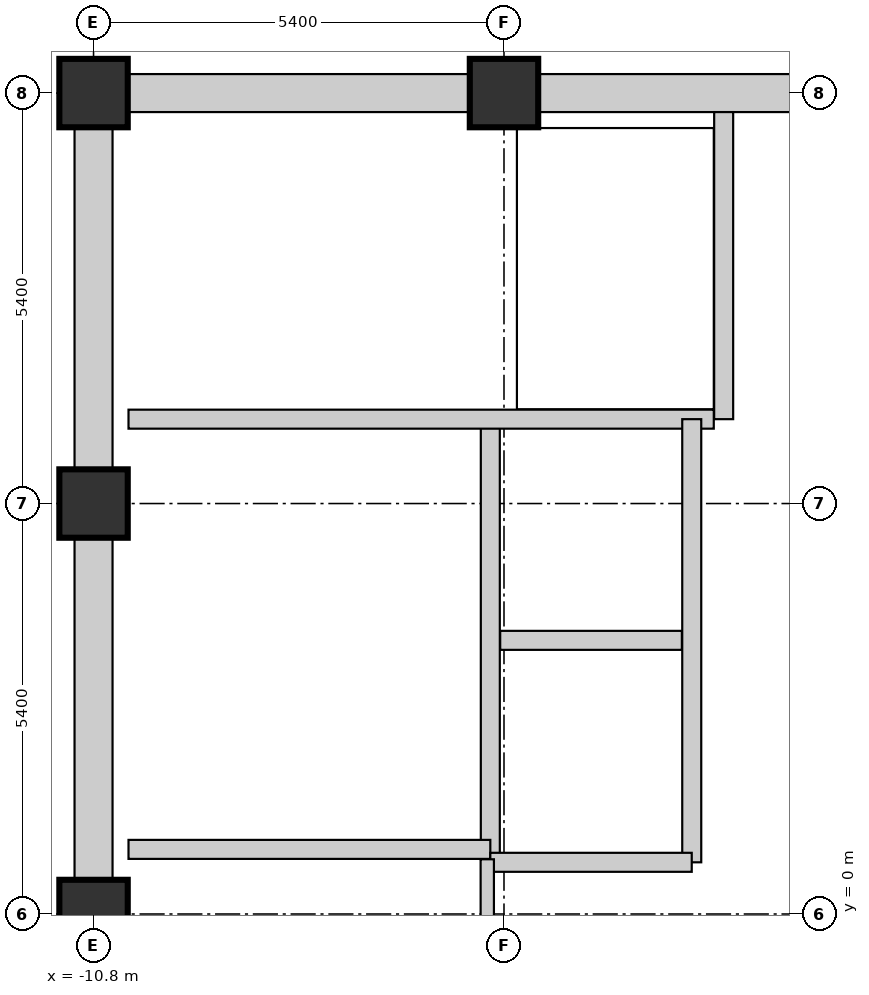
"""IFC4 building model, lengths in metres.
Left out: names, types, materials, properties, quantities, classifications, styles, units other than length and angle.
Written with IfcOpenShell. Run it as: python <this file> out.ifc"""

import sys

from ifc_helpers import new_model, si_unit, direction, frame, frame_2d, origin, origin_2d, place, context, subcontext, project, spatial, rectangle, extrude, element, fill, save


model = new_model("IFC4")
c1 = context("Model", 3, precision=1e-05, world=origin(), true_north=direction((0.0, 1.0)))
c2 = subcontext(c1, "Body", "Model", "MODEL_VIEW")
j1 = project(units=[si_unit("LENGTHUNIT", "METRE"), si_unit("PLANEANGLEUNIT", "RADIAN")], contexts=[c1])
p1 = place(None, origin())
s1 = spatial("IfcSite", under=j1, at=p1, CompositionType="ELEMENT")
p2 = place(p1, origin())
s2 = spatial("IfcBuilding", under=s1, at=p2, CompositionType="ELEMENT")
p3 = place(p2, frame((0.0, 0.0, 337.5)))
s3 = spatial("IfcBuildingStorey", under=s2, at=p3, CompositionType="ELEMENT", Elevation=337.5)
for number, where, z_axis, x_axis in (
    (1, (-10.8, 0.0, 0.0), (0.0, 0.0, 1.0), (1.0, 0.0, 0.0)),
    (2, (-10.8, 5.4, 0.0), (0.0, 0.0, 1.0), (1.0, 0.0, 0.0)),
    (3, (-10.8, 10.8, 0.0), (0.0, 0.0, 1.0), (1.0, 0.0, 0.0)),
    (4, (-5.4, 10.8, 0.0), (0.0, 0.0, 1.0), (1.0, 0.0, 0.0)),
):
    element("IfcColumn", number, at=place(p3, frame(where, z_axis=z_axis, x_axis=x_axis)), inside=s3, PredefinedType="COLUMN", context=c2, shape_type="SweptSolid", body=[
        extrude(rectangle(XDim=0.9, YDim=0.9, at=origin_2d()), origin(), (0.0, 0.0, 1.0), 4.5),
    ])
p4 = place(p3, frame((-10.34, 10.8, 0.0), z_axis=(0.0, 0.0, 1.0), x_axis=(1.0, 0.0, 0.0)))
e5 = element("IfcWall", 5, at=p4, inside=s3, PredefinedType="SHEAR", context=c2, shape_type="SweptSolid", body=[
    extrude(rectangle(XDim=4.48, YDim=0.5, at=frame_2d((2.24, 0.0))), origin(), (0.0, 0.0, 1.0), 4.5),
])
p5 = place(p3, frame((-4.94, 10.8, 0.0), z_axis=(0.0, 0.0, 1.0), x_axis=(1.0, 0.0, 0.0)))
e6 = element("IfcWall", 6, at=p5, inside=s3, PredefinedType="SHEAR", context=c2, shape_type="SweptSolid", body=[
    extrude(rectangle(XDim=4.48, YDim=0.5, at=frame_2d((2.24, 0.0))), origin(), (0.0, 0.0, 1.0), 4.5),
])
p6 = place(p5, frame((3.13, 0.0, 0.0)))
e7 = element("IfcOpeningElement", 7, at=p6, cuts=e6, PredefinedType="OPENING", context=c2, shape_type="SweptSolid", body=[
    extrude(rectangle(XDim=1.1, YDim=2.1, at=frame_2d((0.55, 1.05))), frame((0.0, 0.26, 0.0), z_axis=(0.0, -1.0, 0.0), x_axis=(1.0, 0.0, 0.0)), (0.0, 0.0, 1.0), 0.52),
])
p7 = place(p3, frame((-10.8, 0.46, 0.0), z_axis=(0.0, 0.0, 1.0), x_axis=(0.0, 1.0, 0.0)))
e8 = element("IfcWall", 8, at=p7, inside=s3, PredefinedType="SHEAR", context=c2, shape_type="SweptSolid", body=[
    extrude(rectangle(XDim=4.48, YDim=0.5, at=frame_2d((2.24, 0.0))), origin(), (0.0, 0.0, 1.0), 4.5),
])
p8 = place(p7, frame((1.69, 0.0, 0.0)))
e9 = element("IfcOpeningElement", 9, at=p8, cuts=e8, PredefinedType="OPENING", context=c2, shape_type="SweptSolid", body=[
    extrude(rectangle(XDim=1.1, YDim=2.1, at=frame_2d((0.55, 1.05))), frame((0.0, 0.26, 0.0), z_axis=(0.0, -1.0, 0.0), x_axis=(1.0, 0.0, 0.0)), (0.0, 0.0, 1.0), 0.52),
])
p9 = place(p3, frame((-10.8, 5.86, 0.0), z_axis=(0.0, 0.0, 1.0), x_axis=(0.0, 1.0, 0.0)))
e10 = element("IfcWall", 10, at=p9, inside=s3, PredefinedType="SHEAR", context=c2, shape_type="SweptSolid", body=[
    extrude(rectangle(XDim=4.48, YDim=0.5, at=frame_2d((2.24, 0.0))), origin(), (0.0, 0.0, 1.0), 4.5),
])
p10 = place(p3, frame((-5.58, 0.72, 0.0), z_axis=(0.0, 0.0, 1.0), x_axis=(0.0, 1.0, 0.0)))
e11 = element("IfcWall", 11, at=p10, inside=s3, PredefinedType="SHEAR", context=c2, shape_type="SweptSolid", body=[
    extrude(rectangle(XDim=5.79, YDim=0.25, at=frame_2d((2.895, 0.0))), origin(), (0.0, 0.0, 1.0), 4.5),
])
p11 = place(p10, frame((3.35, 0.0, 0.0)))
e12 = element("IfcOpeningElement", 12, at=p11, cuts=e11, PredefinedType="OPENING", context=c2, shape_type="SweptSolid", body=[
    extrude(rectangle(XDim=1.1, YDim=2.1, at=frame_2d((0.55, 1.05))), frame((0.0, 0.135, 0.0), z_axis=(0.0, -1.0, 0.0), x_axis=(1.0, 0.0, 0.0)), (0.0, 0.0, 1.0), 0.27),
])
p12 = place(p3, frame((-10.34, 0.85, 0.0), z_axis=(0.0, 0.0, 1.0), x_axis=(1.0, 0.0, 0.0)))
e13 = element("IfcWall", 13, at=p12, inside=s3, PredefinedType="SHEAR", context=c2, shape_type="SweptSolid", body=[
    extrude(rectangle(XDim=4.76, YDim=0.25, at=frame_2d((2.38, 0.0))), origin(), (0.0, 0.0, 1.0), 4.5),
])
p13 = place(p12, frame((1.4, 0.0, 0.0)))
e14 = element("IfcOpeningElement", 14, at=p13, cuts=e13, PredefinedType="OPENING", context=c2, shape_type="SweptSolid", body=[
    extrude(rectangle(XDim=0.95, YDim=2.1, at=frame_2d((0.475, 1.05))), frame((0.0, 0.135, 0.0), z_axis=(0.0, -1.0, 0.0), x_axis=(1.0, 0.0, 0.0)), (0.0, 0.0, 1.0), 0.27),
])
p14 = place(p3, frame((-2.51, 6.51, 0.0), z_axis=(0.0, 0.0, 1.0), x_axis=(0.0, 1.0, 0.0)))
e15 = element("IfcWall", 15, at=p14, inside=s3, PredefinedType="SHEAR", context=c2, shape_type="SweptSolid", body=[
    extrude(rectangle(XDim=4.04, YDim=0.25, at=frame_2d((2.02, 0.0))), origin(), (0.0, 0.0, 1.0), 4.5),
])
p15 = place(p3, frame((-10.34, 6.51, 0.0), z_axis=(0.0, 0.0, 1.0), x_axis=(1.0, 0.0, 0.0)))
e16 = element("IfcWall", 16, at=p15, inside=s3, PredefinedType="SHEAR", context=c2, shape_type="SweptSolid", body=[
    extrude(rectangle(XDim=7.7, YDim=0.25, at=frame_2d((3.85, 0.0))), origin(), (0.0, 0.0, 1.0), 4.5),
])
p16 = place(p15, frame((0.35, 0.0, 0.0)))
e17 = element("IfcOpeningElement", 17, at=p16, cuts=e16, PredefinedType="OPENING", context=c2, shape_type="SweptSolid", body=[
    extrude(rectangle(XDim=1.1, YDim=2.1, at=frame_2d((0.55, 1.05))), frame((0.0, 0.135, 0.0), z_axis=(0.0, -1.0, 0.0), x_axis=(1.0, 0.0, 0.0)), (0.0, 0.0, 1.0), 0.27),
])
p17 = place(p3, frame((-2.93, 0.68, 0.0), z_axis=(0.0, 0.0, 1.0), x_axis=(0.0, 1.0, 0.0)))
e18 = element("IfcWall", 18, at=p17, inside=s3, PredefinedType="SHEAR", context=c2, shape_type="SweptSolid", body=[
    extrude(rectangle(XDim=5.83, YDim=0.25, at=frame_2d((2.915, 0.0))), origin(), (0.0, 0.0, 1.0), 4.5),
])
p18 = place(p17, frame((0.75, 0.0, 0.0)))
e19 = element("IfcOpeningElement", 19, at=p18, cuts=e18, PredefinedType="OPENING", context=c2, shape_type="SweptSolid", body=[
    extrude(rectangle(XDim=1.2, YDim=2.1, at=frame_2d((0.6, 1.05))), frame((0.0, 0.135, 0.0), z_axis=(0.0, -1.0, 0.0), x_axis=(1.0, 0.0, 0.0)), (0.0, 0.0, 1.0), 0.27),
])
p19 = place(p3, frame((-5.45, 3.6, 0.0), z_axis=(0.0, 0.0, 1.0), x_axis=(1.0, 0.0, 0.0)))
e20 = element("IfcWall", 20, at=p19, inside=s3, PredefinedType="SHEAR", context=c2, shape_type="SweptSolid", body=[
    extrude(rectangle(XDim=2.39, YDim=0.25, at=frame_2d((1.195, 0.0))), origin(), (0.0, 0.0, 1.0), 4.5),
])
p20 = place(p3, frame((-5.58, 0.68, 0.0), z_axis=(0.0, 0.0, 1.0), x_axis=(1.0, 0.0, 0.0)))
e21 = element("IfcWall", 21, at=p20, inside=s3, PredefinedType="SHEAR", context=c2, shape_type="SweptSolid", body=[
    extrude(rectangle(XDim=2.65, YDim=0.25, at=frame_2d((1.325, 0.0))), origin(), (0.0, 0.0, 1.0), 4.5),
])
p21 = place(p3, frame((-5.62, -1.42, 0.0), z_axis=(0.0, 0.0, 1.0), x_axis=(0.0, 1.0, 0.0)))
e22 = element("IfcWall", 22, at=p21, inside=s3, PredefinedType="PARTITIONING", context=c2, shape_type="SweptSolid", body=[
    extrude(rectangle(XDim=2.14, YDim=0.175, at=frame_2d((1.07, 0.0))), origin(), (0.0, 0.0, 1.0), 4.22),
])
p22 = place(p16, origin())
e23 = element("IfcDoor", 23, at=p22, inside=s3, OperationType="SINGLE_SWING_LEFT", PredefinedType="DOOR", context=c2, shape_type="SweptSolid", body=[
    extrude(rectangle(XDim=1.1, YDim=2.1, at=frame_2d((0.55, 1.05))), frame((0.0, 0.025, 0.0), z_axis=(0.0, -1.0, 0.0), x_axis=(1.0, 0.0, 0.0)), (0.0, 0.0, 1.0), 0.05),
])
fill(e17, e23)
p23 = place(p6, origin())
e24 = element("IfcDoor", 24, at=p23, inside=s3, OperationType="SINGLE_SWING_LEFT", PredefinedType="DOOR", context=c2, shape_type="SweptSolid", body=[
    extrude(rectangle(XDim=1.1, YDim=2.1, at=frame_2d((0.55, 1.05))), frame((0.0, 0.025, 0.0), z_axis=(0.0, -1.0, 0.0), x_axis=(1.0, 0.0, 0.0)), (0.0, 0.0, 1.0), 0.05),
])
fill(e7, e24)
p24 = place(p8, origin())
e25 = element("IfcDoor", 25, at=p24, inside=s3, OperationType="SINGLE_SWING_LEFT", PredefinedType="DOOR", context=c2, shape_type="SweptSolid", body=[
    extrude(rectangle(XDim=1.1, YDim=2.1, at=frame_2d((0.55, 1.05))), frame((0.0, 0.025, 0.0), z_axis=(0.0, -1.0, 0.0), x_axis=(1.0, 0.0, 0.0)), (0.0, 0.0, 1.0), 0.05),
])
fill(e9, e25)
p25 = place(p13, origin())
e26 = element("IfcDoor", 26, at=p25, inside=s3, OperationType="SINGLE_SWING_RIGHT", PredefinedType="DOOR", context=c2, shape_type="SweptSolid", body=[
    extrude(rectangle(XDim=0.95, YDim=2.1, at=frame_2d((0.475, 1.05))), frame((0.0, 0.025, 0.0), z_axis=(0.0, -1.0, 0.0), x_axis=(1.0, 0.0, 0.0)), (0.0, 0.0, 1.0), 0.05),
])
fill(e14, e26)
p26 = place(p11, origin())
e27 = element("IfcDoor", 27, at=p26, inside=s3, OperationType="SLIDING_TO_LEFT", PredefinedType="DOOR", context=c2, shape_type="SweptSolid", body=[
    extrude(rectangle(XDim=1.1, YDim=2.1, at=frame_2d((0.55, 1.05))), frame((0.0, 0.025, 0.0), z_axis=(0.0, -1.0, 0.0), x_axis=(1.0, 0.0, 0.0)), (0.0, 0.0, 1.0), 0.05),
])
fill(e12, e27)
p27 = place(p18, origin())
e28 = element("IfcDoor", 28, at=p27, inside=s3, OperationType="SLIDING_TO_LEFT", PredefinedType="DOOR", context=c2, shape_type="SweptSolid", body=[
    extrude(rectangle(XDim=1.2, YDim=2.1, at=frame_2d((0.6, 1.05))), frame((0.0, 0.025, 0.0), z_axis=(0.0, -1.0, 0.0), x_axis=(1.0, 0.0, 0.0)), (0.0, 0.0, 1.0), 0.05),
])
fill(e19, e28)
save(model, sys.argv[1])
